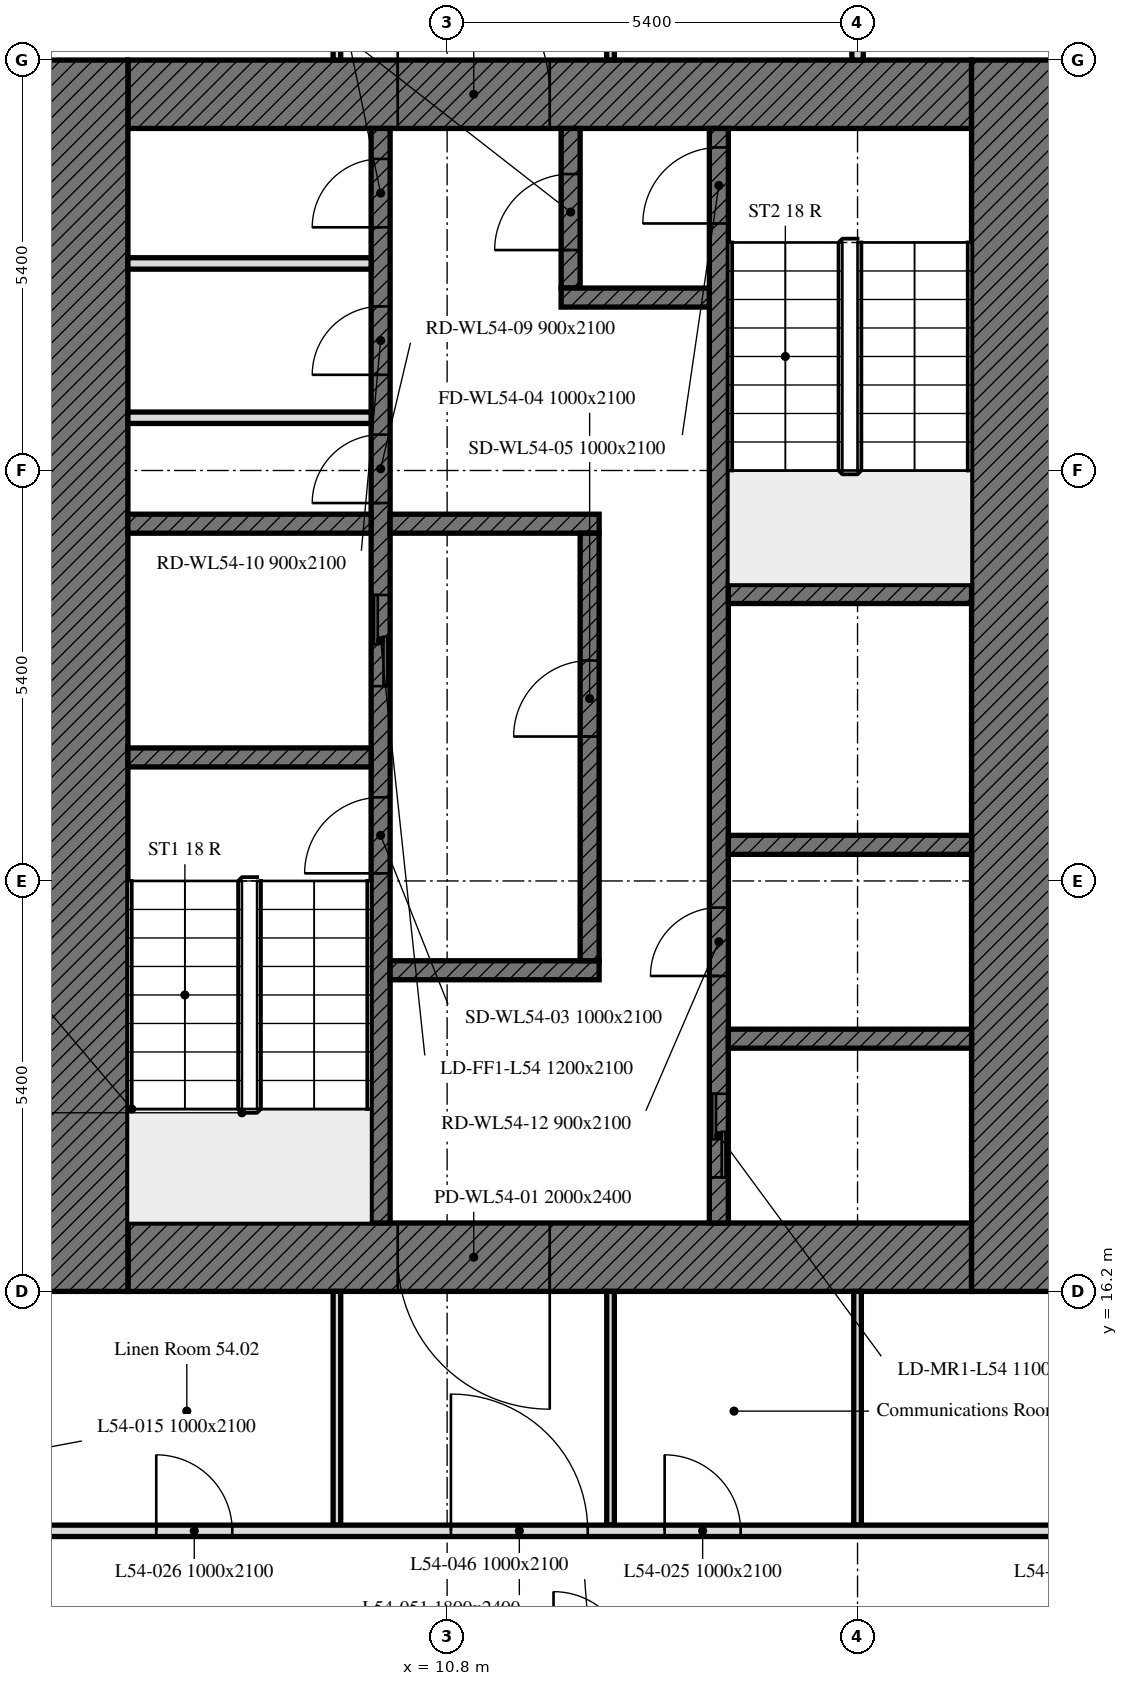
"""IFC4 building model, lengths in metres.
Left out: names, types, materials, properties, quantities, classifications, styles, units other than length and angle.
Written with IfcOpenShell. Run it as: python <this file> out.ifc"""

import sys

from ifc_helpers import new_model, si_unit, direction, frame, frame_2d, origin, place, context, subcontext, project, spatial, rectangle, extrude, element, fill, save


model = new_model("IFC4")
c1 = context("Model", 3, precision=1e-05, world=origin(), true_north=direction((0.0, 1.0)))
c2 = subcontext(c1, "Body", "Model", "MODEL_VIEW")
j1 = project(units=[si_unit("LENGTHUNIT", "METRE"), si_unit("PLANEANGLEUNIT", "RADIAN")], contexts=[c1])
p1 = place(None, origin())
s1 = spatial("IfcSite", under=j1, at=p1, CompositionType="ELEMENT")
p2 = place(p1, origin())
s2 = spatial("IfcBuilding", under=s1, at=p2, CompositionType="ELEMENT")
p3 = place(p2, frame((0.0, 0.0, 217.0)))
s3 = spatial("IfcBuildingStorey", under=s2, at=p3, CompositionType="ELEMENT", Elevation=217.0)
p4 = place(p3, frame((17.7, 16.65, 0.0), z_axis=(0.0, 0.0, 1.0), x_axis=(-1.0, 0.0, 0.0)))
e1 = element("IfcWall", 1, at=p4, inside=s3, PredefinedType="SOLIDWALL", context=c2, shape_type="SweptSolid", body=[
    extrude(rectangle(XDim=11.1, YDim=0.9, at=frame_2d((5.55, 0.0))), origin(), (0.0, 0.0, 1.0), 3.0),
])
p5 = place(p4, frame((5.55, 0.0, 0.0)))
e2 = element("IfcOpeningElement", 2, at=p5, cuts=e1, PredefinedType="OPENING", context=c2, shape_type="SweptSolid", body=[
    extrude(rectangle(XDim=2.0, YDim=2.4, at=frame_2d((1.0, 1.2))), frame((0.0, 0.45, 0.0), z_axis=(0.0, -1.0, 0.0), x_axis=(1.0, 0.0, 0.0)), (0.0, 0.0, 1.0), 0.9),
])
p6 = place(p3, frame((6.6, 31.95, 0.0), z_axis=(0.0, 0.0, 1.0), x_axis=(1.0, 0.0, 0.0)))
e3 = element("IfcWall", 3, at=p6, inside=s3, PredefinedType="SOLIDWALL", context=c2, shape_type="SweptSolid", body=[
    extrude(rectangle(XDim=11.1, YDim=0.9, at=frame_2d((5.55, 0.0))), origin(), (0.0, 0.0, 1.0), 3.0),
])
p7 = place(p6, frame((3.55, 0.0, 0.0)))
e4 = element("IfcOpeningElement", 4, at=p7, cuts=e3, PredefinedType="OPENING", context=c2, shape_type="SweptSolid", body=[
    extrude(rectangle(XDim=2.0, YDim=2.4, at=frame_2d((1.0, 1.2))), frame((0.0, 0.45, 0.0), z_axis=(0.0, -1.0, 0.0), x_axis=(1.0, 0.0, 0.0)), (0.0, 0.0, 1.0), 0.9),
])
for number, where, z_axis, x_axis in (
    (5, (6.0, 16.2, 0.0), (0.0, 0.0, 1.0), (0.0, 1.0, 0.0)),
    (6, (18.3, 32.4, 0.0), (0.0, 0.0, 1.0), (0.0, -1.0, 0.0)),
):
    element("IfcWall", number, at=place(p3, frame(where, z_axis=z_axis, x_axis=x_axis)), inside=s3, PredefinedType="SOLIDWALL", context=c2, shape_type="SweptSolid", body=[
        extrude(rectangle(XDim=16.2, YDim=1.2, at=frame_2d((8.1, 0.0))), origin(), (0.0, 0.0, 1.0), 3.0),
    ])
p8 = place(p3, frame((9.925, 17.1, 0.0), z_axis=(0.0, 0.0, 1.0), x_axis=(0.0, 1.0, 0.0)))
e7 = element("IfcWall", 7, at=p8, inside=s3, PredefinedType="SOLIDWALL", context=c2, shape_type="SweptSolid", body=[
    extrude(rectangle(XDim=14.4, YDim=0.25, at=frame_2d((7.2, 0.0))), origin(), (0.0, 0.0, 1.0), 3.0),
])
p9 = place(p8, frame((4.6, 0.0, 0.0)))
e8 = element("IfcOpeningElement", 8, at=p9, cuts=e7, PredefinedType="OPENING", context=c2, shape_type="SweptSolid", body=[
    extrude(rectangle(XDim=1.0, YDim=2.1, at=frame_2d((0.5, 1.05))), frame((0.0, 0.125, 0.0), z_axis=(0.0, -1.0, 0.0), x_axis=(1.0, 0.0, 0.0)), (0.0, 0.0, 1.0), 0.25),
])
p10 = place(p8, frame((7.062, 0.0, 0.0)))
e9 = element("IfcOpeningElement", 9, at=p10, cuts=e7, PredefinedType="OPENING", context=c2, shape_type="SweptSolid", body=[
    extrude(rectangle(XDim=1.2, YDim=2.1, at=frame_2d((0.6, 1.05))), frame((0.0, 0.125, 0.0), z_axis=(0.0, -1.0, 0.0), x_axis=(1.0, 0.0, 0.0)), (0.0, 0.0, 1.0), 0.25),
])
p11 = place(p8, frame((9.472, 0.0, 0.0)))
e10 = element("IfcOpeningElement", 10, at=p11, cuts=e7, PredefinedType="OPENING", context=c2, shape_type="SweptSolid", body=[
    extrude(rectangle(XDim=0.9, YDim=2.1, at=frame_2d((0.45, 1.05))), frame((0.0, 0.125, 0.0), z_axis=(0.0, -1.0, 0.0), x_axis=(1.0, 0.0, 0.0)), (0.0, 0.0, 1.0), 0.25),
])
p12 = place(p8, frame((11.159, 0.0, 0.0)))
e11 = element("IfcOpeningElement", 11, at=p12, cuts=e7, PredefinedType="OPENING", context=c2, shape_type="SweptSolid", body=[
    extrude(rectangle(XDim=0.9, YDim=2.1, at=frame_2d((0.45, 1.05))), frame((0.0, 0.125, 0.0), z_axis=(0.0, -1.0, 0.0), x_axis=(1.0, 0.0, 0.0)), (0.0, 0.0, 1.0), 0.25),
])
p13 = place(p8, frame((13.1, 0.0, 0.0)))
e12 = element("IfcOpeningElement", 12, at=p13, cuts=e7, PredefinedType="OPENING", context=c2, shape_type="SweptSolid", body=[
    extrude(rectangle(XDim=0.9, YDim=2.1, at=frame_2d((0.45, 1.05))), frame((0.0, 0.125, 0.0), z_axis=(0.0, -1.0, 0.0), x_axis=(1.0, 0.0, 0.0)), (0.0, 0.0, 1.0), 0.25),
])
p14 = place(p3, frame((14.375, 17.1, 0.0), z_axis=(0.0, 0.0, 1.0), x_axis=(0.0, 1.0, 0.0)))
e13 = element("IfcWall", 13, at=p14, inside=s3, PredefinedType="SOLIDWALL", context=c2, shape_type="SweptSolid", body=[
    extrude(rectangle(XDim=14.4, YDim=0.25, at=frame_2d((7.2, 0.0))), origin(), (0.0, 0.0, 1.0), 3.0),
])
p15 = place(p14, frame((13.15, 0.0, 0.0)))
e14 = element("IfcOpeningElement", 14, at=p15, cuts=e13, PredefinedType="OPENING", context=c2, shape_type="SweptSolid", body=[
    extrude(rectangle(XDim=1.0, YDim=2.1, at=frame_2d((0.5, 1.05))), frame((0.0, 0.125, 0.0), z_axis=(0.0, -1.0, 0.0), x_axis=(1.0, 0.0, 0.0)), (0.0, 0.0, 1.0), 0.25),
])
p16 = place(p14, frame((0.6, 0.0, 0.0)))
e15 = element("IfcOpeningElement", 15, at=p16, cuts=e13, PredefinedType="OPENING", context=c2, shape_type="SweptSolid", body=[
    extrude(rectangle(XDim=1.1, YDim=2.1, at=frame_2d((0.55, 1.05))), frame((0.0, 0.125, 0.0), z_axis=(0.0, -1.0, 0.0), x_axis=(1.0, 0.0, 0.0)), (0.0, 0.0, 1.0), 0.25),
])
p17 = place(p14, frame((3.25, 0.0, 0.0)))
e16 = element("IfcOpeningElement", 16, at=p17, cuts=e13, PredefinedType="OPENING", context=c2, shape_type="SweptSolid", body=[
    extrude(rectangle(XDim=0.9, YDim=2.1, at=frame_2d((0.45, 1.05))), frame((0.0, 0.125, 0.0), z_axis=(0.0, -1.0, 0.0), x_axis=(1.0, 0.0, 0.0)), (0.0, 0.0, 1.0), 0.25),
])
for number, where, z_axis, x_axis in (
    (17, (6.6, 23.225, 0.0), (0.0, 0.0, 1.0), (1.0, 0.0, 0.0)),
    (18, (14.5, 25.375, 0.0), (0.0, 0.0, 1.0), (1.0, 0.0, 0.0)),
    (19, (14.5, 22.075, 0.0), (0.0, 0.0, 1.0), (1.0, 0.0, 0.0)),
    (20, (6.6, 26.3, 0.0), (0.0, 0.0, 1.0), (1.0, 0.0, 0.0)),
):
    element("IfcWall", number, at=place(p3, frame(where, z_axis=z_axis, x_axis=x_axis)), inside=s3, PredefinedType="SOLIDWALL", context=c2, shape_type="SweptSolid", body=[
        extrude(rectangle(XDim=3.2, YDim=0.25, at=frame_2d((1.6, 0.0))), origin(), (0.0, 0.0, 1.0), 3.0),
    ])
for number, where, z_axis, x_axis in (
    (21, (10.05, 26.3, 0.0), (0.0, 0.0, 1.0), (1.0, 0.0, 0.0)),
    (22, (10.05, 20.425, 0.0), (0.0, 0.0, 1.0), (1.0, 0.0, 0.0)),
):
    element("IfcWall", number, at=place(p3, frame(where, z_axis=z_axis, x_axis=x_axis)), inside=s3, PredefinedType="SOLIDWALL", context=c2, shape_type="SweptSolid", body=[
        extrude(rectangle(XDim=2.75, YDim=0.25, at=frame_2d((1.375, 0.0))), origin(), (0.0, 0.0, 1.0), 3.0),
    ])
p18 = place(p3, frame((12.425, 29.4, 0.0), z_axis=(0.0, 0.0, 1.0), x_axis=(0.0, 1.0, 0.0)))
e23 = element("IfcWall", 23, at=p18, inside=s3, PredefinedType="SOLIDWALL", context=c2, shape_type="SweptSolid", body=[
    extrude(rectangle(XDim=2.1, YDim=0.25, at=frame_2d((1.05, 0.0))), origin(), (0.0, 0.0, 1.0), 3.0),
])
p19 = place(p18, frame((0.5, 0.0, 0.0)))
e24 = element("IfcOpeningElement", 24, at=p19, cuts=e23, PredefinedType="OPENING", context=c2, shape_type="SweptSolid", body=[
    extrude(rectangle(XDim=1.0, YDim=2.1, at=frame_2d((0.5, 1.05))), frame((0.0, 0.125, 0.0), z_axis=(0.0, -1.0, 0.0), x_axis=(1.0, 0.0, 0.0)), (0.0, 0.0, 1.0), 0.25),
])
p20 = place(p3, frame((12.3, 29.275, 0.0), z_axis=(0.0, 0.0, 1.0), x_axis=(1.0, 0.0, 0.0)))
e25 = element("IfcWall", 25, at=p20, inside=s3, PredefinedType="SOLIDWALL", context=c2, shape_type="SweptSolid", body=[
    extrude(rectangle(XDim=1.95, YDim=0.25, at=frame_2d((0.975, 0.0))), origin(), (0.0, 0.0, 1.0), 3.0),
])
p21 = place(p3, frame((12.675, 20.55, 0.0), z_axis=(0.0, 0.0, 1.0), x_axis=(0.0, 1.0, 0.0)))
e26 = element("IfcWall", 26, at=p21, inside=s3, PredefinedType="SOLIDWALL", context=c2, shape_type="SweptSolid", body=[
    extrude(rectangle(XDim=5.625, YDim=0.25, at=frame_2d((2.812, 0.0))), origin(), (0.0, 0.0, 1.0), 3.0),
])
p22 = place(p21, frame((2.95, 0.0, 0.0)))
e27 = element("IfcOpeningElement", 27, at=p22, cuts=e26, PredefinedType="OPENING", context=c2, shape_type="SweptSolid", body=[
    extrude(rectangle(XDim=1.0, YDim=2.1, at=frame_2d((0.5, 1.05))), frame((0.0, 0.125, 0.0), z_axis=(0.0, -1.0, 0.0), x_axis=(1.0, 0.0, 0.0)), (0.0, 0.0, 1.0), 0.25),
])
p23 = place(p3, frame((14.5, 19.525, 0.0), z_axis=(0.0, 0.0, 1.0), x_axis=(1.0, 0.0, 0.0)))
e28 = element("IfcWall", 28, at=p23, inside=s3, PredefinedType="SOLIDWALL", context=c2, shape_type="SweptSolid", body=[
    extrude(rectangle(XDim=3.2, YDim=0.25, at=frame_2d((1.6, 0.0))), origin(), (0.0, 0.0, 1.0), 3.0),
])
for number, where, z_axis, x_axis in (
    (29, (6.6, 27.694, 0.0), (0.0, 0.0, 1.0), (1.0, 0.0, 0.0)),
    (30, (6.6, 29.724, 0.0), (0.0, 0.0, 1.0), (1.0, 0.0, 0.0)),
):
    element("IfcWall", number, at=place(p3, frame(where, z_axis=z_axis, x_axis=x_axis)), inside=s3, PredefinedType="PARTITIONING", context=c2, shape_type="SweptSolid", body=[
        extrude(rectangle(XDim=3.2, YDim=0.15, at=frame_2d((1.6, 0.0))), origin(), (0.0, 0.0, 1.0), 3.0),
    ])
p24 = place(p3, frame((16.2, 37.405, 0.0), z_axis=(0.0, 0.0, 1.0), x_axis=(0.0, -1.0, 0.0)))
e31 = element("IfcWall", 31, at=p24, inside=s3, PredefinedType="PARTITIONING", context=c2, shape_type="SweptSolid", body=[
    extrude(rectangle(XDim=5.005, YDim=0.15, at=frame_2d((2.502, 0.0))), origin(), (0.0, 0.0, 1.0), 2.4),
])
for number, where, z_axis, x_axis in (
    (32, (12.95, 32.4, 0.0), (0.0, 0.0, 1.0), (0.0, 1.0, 0.0)),
    (33, (9.35, 39.525, 0.0), (0.0, 0.0, 1.0), (0.0, -1.0, 0.0)),
):
    element("IfcWall", number, at=place(p3, frame(where, z_axis=z_axis, x_axis=x_axis)), inside=s3, PredefinedType="PARTITIONING", context=c2, shape_type="SweptSolid", body=[
        extrude(rectangle(XDim=7.125, YDim=0.1, at=frame_2d((3.562, 0.0))), origin(), (0.0, 0.0, 1.0), 2.4),
    ])
for number, where, z_axis, x_axis in (
    (34, (16.2, 16.2, 0.0), (0.0, 0.0, 1.0), (0.0, -1.0, 0.0)),
    (35, (12.95, 13.125, 0.0), (0.0, 0.0, 1.0), (0.0, 1.0, 0.0)),
    (36, (9.35, 16.2, 0.0), (0.0, 0.0, 1.0), (0.0, -1.0, 0.0)),
):
    element("IfcWall", number, at=place(p3, frame(where, z_axis=z_axis, x_axis=x_axis)), inside=s3, PredefinedType="PARTITIONING", context=c2, shape_type="SweptSolid", body=[
        extrude(rectangle(XDim=3.075, YDim=0.1, at=frame_2d((1.538, 0.0))), origin(), (0.0, 0.0, 1.0), 3.0),
    ])
p25 = place(p3, frame((5.325, 13.05, 0.0), z_axis=(0.0, 0.0, 1.0), x_axis=(1.0, 0.0, 0.0)))
e37 = element("IfcWall", 37, at=p25, inside=s3, PredefinedType="PARTITIONING", context=c2, shape_type="SweptSolid", body=[
    extrude(rectangle(XDim=37.124, YDim=0.15, at=frame_2d((18.562, 0.0))), origin(), (0.0, 0.0, 1.0), 3.0),
])
p26 = place(p25, frame((23.875, 0.0, 0.0)))
e38 = element("IfcOpeningElement", 38, at=p26, cuts=e37, PredefinedType="OPENING", context=c2, shape_type="SweptSolid", body=[
    extrude(rectangle(XDim=1.0, YDim=2.1, at=frame_2d((0.5, 1.05))), frame((0.0, 0.075, 0.0), z_axis=(0.0, -1.0, 0.0), x_axis=(1.0, 0.0, 0.0)), (0.0, 0.0, 1.0), 0.15),
])
p27 = place(p25, frame((13.475, 0.0, 0.0)))
e39 = element("IfcOpeningElement", 39, at=p27, cuts=e37, PredefinedType="OPENING", context=c2, shape_type="SweptSolid", body=[
    extrude(rectangle(XDim=1.0, YDim=2.1, at=frame_2d((0.5, 1.05))), frame((0.0, 0.075, 0.0), z_axis=(0.0, -1.0, 0.0), x_axis=(1.0, 0.0, 0.0)), (0.0, 0.0, 1.0), 0.15),
])
p28 = place(p25, frame((34.095, 0.0, 0.0)))
e40 = element("IfcOpeningElement", 40, at=p28, cuts=e37, PredefinedType="OPENING", context=c2, shape_type="SweptSolid", body=[
    extrude(rectangle(XDim=1.0, YDim=2.1, at=frame_2d((0.5, 1.05))), frame((0.0, 0.075, 0.0), z_axis=(0.0, -1.0, 0.0), x_axis=(1.0, 0.0, 0.0)), (0.0, 0.0, 1.0), 0.15),
])
p29 = place(p25, frame((8.337, 0.0, 0.0)))
e41 = element("IfcOpeningElement", 41, at=p29, cuts=e37, PredefinedType="OPENING", context=c2, shape_type="SweptSolid", body=[
    extrude(rectangle(XDim=1.0, YDim=2.1, at=frame_2d((0.5, 1.05))), frame((0.0, 0.075, 0.0), z_axis=(0.0, -1.0, 0.0), x_axis=(1.0, 0.0, 0.0)), (0.0, 0.0, 1.0), 0.15),
])
p30 = place(p25, frame((1.648, 0.0, 0.0)))
e42 = element("IfcOpeningElement", 42, at=p30, cuts=e37, PredefinedType="OPENING", context=c2, shape_type="SweptSolid", body=[
    extrude(rectangle(XDim=1.0, YDim=2.1, at=frame_2d((0.5, 1.05))), frame((0.0, 0.075, 0.0), z_axis=(0.0, -1.0, 0.0), x_axis=(1.0, 0.0, 0.0)), (0.0, 0.0, 1.0), 0.15),
])
p31 = place(p25, frame((28.613, 0.0, 0.0)))
e43 = element("IfcOpeningElement", 43, at=p31, cuts=e37, PredefinedType="OPENING", context=c2, shape_type="SweptSolid", body=[
    extrude(rectangle(XDim=1.0, YDim=2.1, at=frame_2d((0.5, 1.05))), frame((0.0, 0.075, 0.0), z_axis=(0.0, -1.0, 0.0), x_axis=(1.0, 0.0, 0.0)), (0.0, 0.0, 1.0), 0.15),
])
p32 = place(p25, frame((30.625, 0.0, 0.0)))
e44 = element("IfcOpeningElement", 44, at=p32, cuts=e37, PredefinedType="OPENING", context=c2, shape_type="SweptSolid", body=[
    extrude(rectangle(XDim=1.8, YDim=2.4, at=frame_2d((0.9, 1.2))), frame((0.0, 0.075, 0.0), z_axis=(0.0, -1.0, 0.0), x_axis=(1.0, 0.0, 0.0)), (0.0, 0.0, 1.0), 0.15),
])
p33 = place(p25, frame((5.525, 0.0, 0.0)))
e45 = element("IfcOpeningElement", 45, at=p33, cuts=e37, PredefinedType="OPENING", context=c2, shape_type="SweptSolid", body=[
    extrude(rectangle(XDim=1.8, YDim=2.4, at=frame_2d((0.9, 1.2))), frame((0.0, 0.075, 0.0), z_axis=(0.0, -1.0, 0.0), x_axis=(1.0, 0.0, 0.0)), (0.0, 0.0, 1.0), 0.15),
])
p34 = place(p5, origin())
e46 = element("IfcDoor", 46, at=p34, inside=s3, OperationType="DOUBLE_DOOR_SINGLE_SWING", PredefinedType="DOOR", context=c2, shape_type="SweptSolid", body=[
    extrude(rectangle(XDim=2.0, YDim=2.4, at=frame_2d((1.0, 1.2))), frame((0.0, 0.025, 0.0), z_axis=(0.0, -1.0, 0.0), x_axis=(1.0, 0.0, 0.0)), (0.0, 0.0, 1.0), 0.05),
])
fill(e2, e46)
p35 = place(p7, origin())
e47 = element("IfcDoor", 47, at=p35, inside=s3, OperationType="DOUBLE_DOOR_SINGLE_SWING", PredefinedType="DOOR", context=c2, shape_type="SweptSolid", body=[
    extrude(rectangle(XDim=2.0, YDim=2.4, at=frame_2d((1.0, 1.2))), frame((0.0, 0.025, 0.0), z_axis=(0.0, -1.0, 0.0), x_axis=(1.0, 0.0, 0.0)), (0.0, 0.0, 1.0), 0.05),
])
fill(e4, e47)
p36 = place(p9, origin())
e48 = element("IfcDoor", 48, at=p36, inside=s3, OperationType="SINGLE_SWING_LEFT", PredefinedType="DOOR", context=c2, shape_type="SweptSolid", body=[
    extrude(rectangle(XDim=1.0, YDim=2.1, at=frame_2d((0.5, 1.05))), frame((0.0, 0.025, 0.0), z_axis=(0.0, -1.0, 0.0), x_axis=(1.0, 0.0, 0.0)), (0.0, 0.0, 1.0), 0.05),
])
fill(e8, e48)
p37 = place(p22, origin())
e49 = element("IfcDoor", 49, at=p37, inside=s3, OperationType="SINGLE_SWING_LEFT", PredefinedType="DOOR", context=c2, shape_type="SweptSolid", body=[
    extrude(rectangle(XDim=1.0, YDim=2.1, at=frame_2d((0.5, 1.05))), frame((0.0, 0.025, 0.0), z_axis=(0.0, -1.0, 0.0), x_axis=(1.0, 0.0, 0.0)), (0.0, 0.0, 1.0), 0.05),
])
fill(e27, e49)
p38 = place(p15, origin())
e50 = element("IfcDoor", 50, at=p38, inside=s3, OperationType="SINGLE_SWING_LEFT", PredefinedType="DOOR", context=c2, shape_type="SweptSolid", body=[
    extrude(rectangle(XDim=1.0, YDim=2.1, at=frame_2d((0.5, 1.05))), frame((0.0, 0.025, 0.0), z_axis=(0.0, -1.0, 0.0), x_axis=(1.0, 0.0, 0.0)), (0.0, 0.0, 1.0), 0.05),
])
fill(e14, e50)
p39 = place(p19, origin())
e51 = element("IfcDoor", 51, at=p39, inside=s3, OperationType="SINGLE_SWING_LEFT", PredefinedType="DOOR", context=c2, shape_type="SweptSolid", body=[
    extrude(rectangle(XDim=1.0, YDim=2.1, at=frame_2d((0.5, 1.05))), frame((0.0, 0.025, 0.0), z_axis=(0.0, -1.0, 0.0), x_axis=(1.0, 0.0, 0.0)), (0.0, 0.0, 1.0), 0.05),
])
fill(e24, e51)
p40 = place(p10, origin())
e52 = element("IfcDoor", 52, at=p40, inside=s3, OperationType="DOUBLE_DOOR_SLIDING", PredefinedType="DOOR", context=c2, shape_type="SweptSolid", body=[
    extrude(rectangle(XDim=1.2, YDim=2.1, at=frame_2d((0.6, 1.05))), frame((0.0, 0.025, 0.0), z_axis=(0.0, -1.0, 0.0), x_axis=(1.0, 0.0, 0.0)), (0.0, 0.0, 1.0), 0.05),
])
fill(e9, e52)
p41 = place(p16, origin())
e53 = element("IfcDoor", 53, at=p41, inside=s3, OperationType="DOUBLE_DOOR_SLIDING", PredefinedType="DOOR", context=c2, shape_type="SweptSolid", body=[
    extrude(rectangle(XDim=1.1, YDim=2.1, at=frame_2d((0.55, 1.05))), frame((0.0, 0.025, 0.0), z_axis=(0.0, -1.0, 0.0), x_axis=(1.0, 0.0, 0.0)), (0.0, 0.0, 1.0), 0.05),
])
fill(e15, e53)
p42 = place(p11, origin())
e54 = element("IfcDoor", 54, at=p42, inside=s3, OperationType="SINGLE_SWING_LEFT", PredefinedType="DOOR", context=c2, shape_type="SweptSolid", body=[
    extrude(rectangle(XDim=0.9, YDim=2.1, at=frame_2d((0.45, 1.05))), frame((0.0, 0.025, 0.0), z_axis=(0.0, -1.0, 0.0), x_axis=(1.0, 0.0, 0.0)), (0.0, 0.0, 1.0), 0.05),
])
fill(e10, e54)
p43 = place(p12, origin())
e55 = element("IfcDoor", 55, at=p43, inside=s3, OperationType="SINGLE_SWING_LEFT", PredefinedType="DOOR", context=c2, shape_type="SweptSolid", body=[
    extrude(rectangle(XDim=0.9, YDim=2.1, at=frame_2d((0.45, 1.05))), frame((0.0, 0.025, 0.0), z_axis=(0.0, -1.0, 0.0), x_axis=(1.0, 0.0, 0.0)), (0.0, 0.0, 1.0), 0.05),
])
fill(e11, e55)
p44 = place(p13, origin())
e56 = element("IfcDoor", 56, at=p44, inside=s3, OperationType="SINGLE_SWING_LEFT", PredefinedType="DOOR", context=c2, shape_type="SweptSolid", body=[
    extrude(rectangle(XDim=0.9, YDim=2.1, at=frame_2d((0.45, 1.05))), frame((0.0, 0.025, 0.0), z_axis=(0.0, -1.0, 0.0), x_axis=(1.0, 0.0, 0.0)), (0.0, 0.0, 1.0), 0.05),
])
fill(e12, e56)
p45 = place(p17, origin())
e57 = element("IfcDoor", 57, at=p45, inside=s3, OperationType="SINGLE_SWING_LEFT", PredefinedType="DOOR", context=c2, shape_type="SweptSolid", body=[
    extrude(rectangle(XDim=0.9, YDim=2.1, at=frame_2d((0.45, 1.05))), frame((0.0, 0.025, 0.0), z_axis=(0.0, -1.0, 0.0), x_axis=(1.0, 0.0, 0.0)), (0.0, 0.0, 1.0), 0.05),
])
fill(e16, e57)
p46 = place(p29, origin())
e58 = element("IfcDoor", 58, at=p46, inside=s3, OperationType="SINGLE_SWING_LEFT", PredefinedType="DOOR", context=c2, shape_type="SweptSolid", body=[
    extrude(rectangle(XDim=1.0, YDim=2.1, at=frame_2d((0.5, 1.05))), frame((0.0, 0.025, 0.0), z_axis=(0.0, -1.0, 0.0), x_axis=(1.0, 0.0, 0.0)), (0.0, 0.0, 1.0), 0.05),
])
fill(e41, e58)
p47 = place(p30, origin())
e59 = element("IfcDoor", 59, at=p47, inside=s3, OperationType="SINGLE_SWING_RIGHT", PredefinedType="DOOR", context=c2, shape_type="SweptSolid", body=[
    extrude(rectangle(XDim=1.0, YDim=2.1, at=frame_2d((0.5, 1.05))), frame((0.0, 0.025, 0.0), z_axis=(0.0, -1.0, 0.0), x_axis=(1.0, 0.0, 0.0)), (0.0, 0.0, 1.0), 0.05),
])
fill(e42, e59)
p48 = place(p33, origin())
e60 = element("IfcDoor", 60, at=p48, inside=s3, OperationType="DOUBLE_DOOR_SINGLE_SWING", PredefinedType="DOOR", context=c2, shape_type="SweptSolid", body=[
    extrude(rectangle(XDim=1.8, YDim=2.4, at=frame_2d((0.9, 1.2))), frame((0.0, 0.025, 0.0), z_axis=(0.0, -1.0, 0.0), x_axis=(1.0, 0.0, 0.0)), (0.0, 0.0, 1.0), 0.05),
])
fill(e45, e60)
save(model, sys.argv[1])
